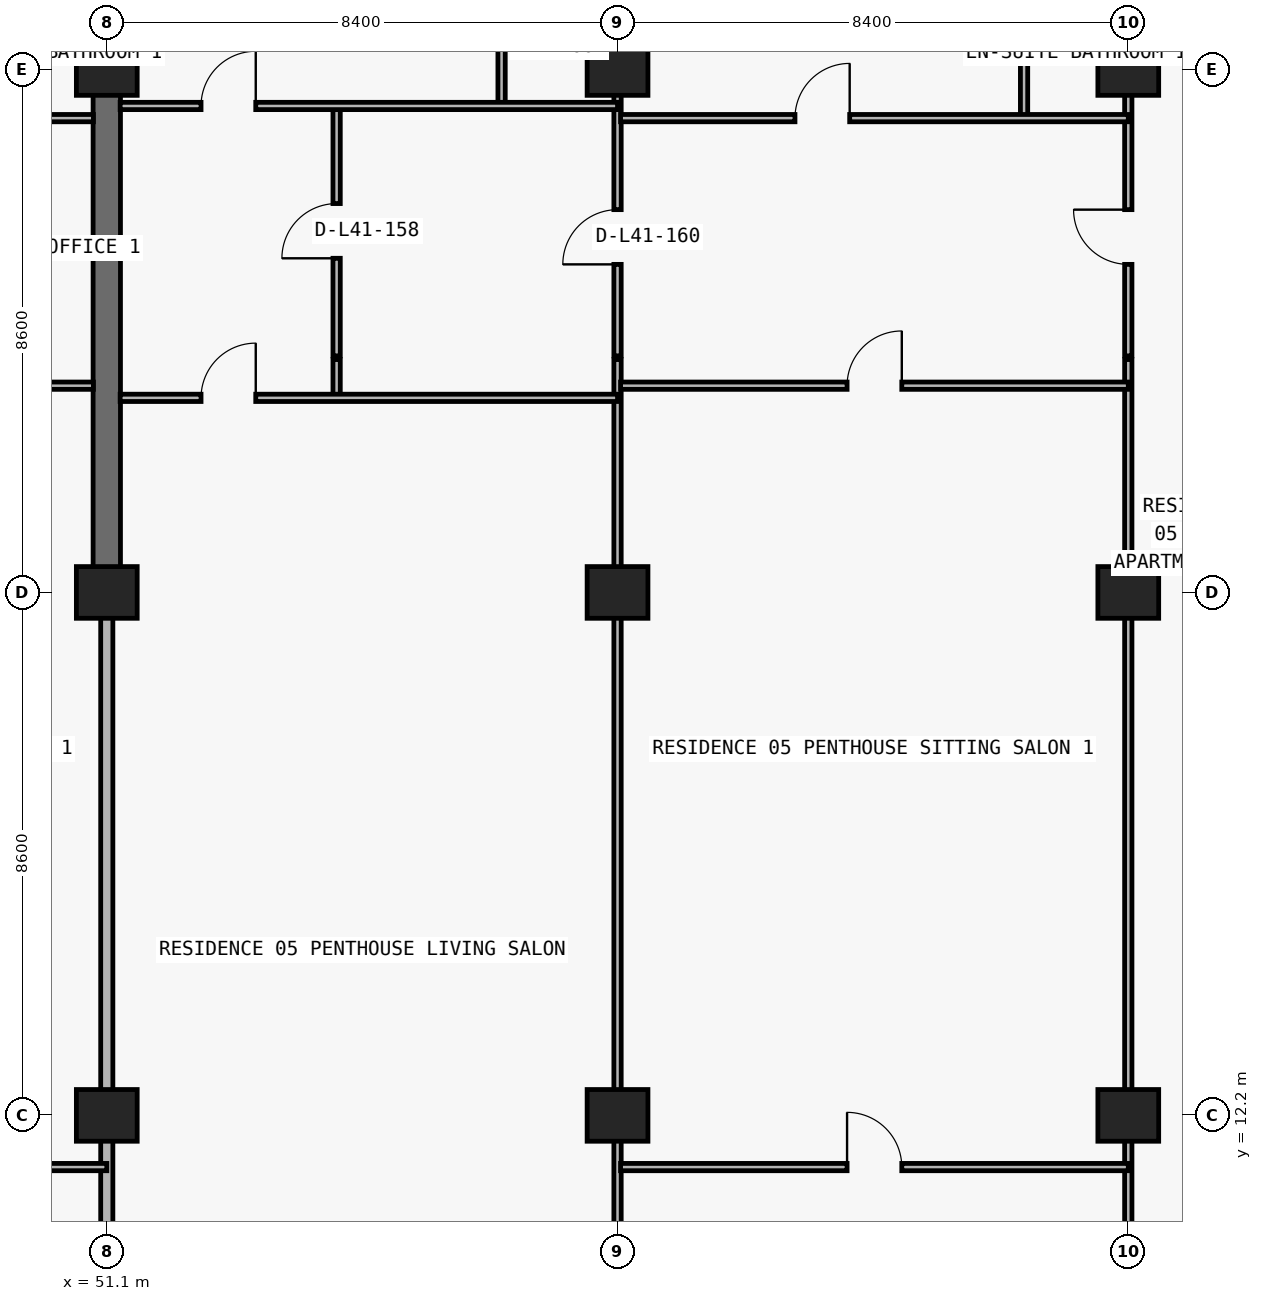
"""IFC4 building model, lengths in metres.
Left out: names, types, materials, properties, quantities, classifications, styles, units other than length and angle.
Written with IfcOpenShell. Run it as: python <this file> out.ifc"""

import sys

from ifc_helpers import new_model, si_unit, direction, frame, frame_2d, origin, origin_2d, place, context, subcontext, project, spatial, rectangle, extrude, element, fill, save


model = new_model("IFC4")
c1 = context("Model", 3, precision=1e-05, world=origin(), true_north=direction((0.0, 1.0)))
c2 = subcontext(c1, "Body", "Model", "MODEL_VIEW")
j1 = project(units=[si_unit("LENGTHUNIT", "METRE"), si_unit("PLANEANGLEUNIT", "RADIAN")], contexts=[c1])
p1 = place(None, origin())
s1 = spatial("IfcSite", under=j1, at=p1, CompositionType="ELEMENT")
p2 = place(p1, origin())
s2 = spatial("IfcBuilding", under=s1, at=p2, CompositionType="ELEMENT")
p3 = place(p2, frame((0.0, 0.0, 148.8)))
s3 = spatial("IfcBuildingStorey", under=s2, at=p3, CompositionType="ELEMENT", Elevation=148.8)
for number, where, z_axis, x_axis in (
    (1, (51.1, 12.2, 0.0), (0.0, 0.0, 1.0), (1.0, 0.0, 0.0)),
    (2, (59.5, 12.2, 0.0), (0.0, 0.0, 1.0), (1.0, 0.0, 0.0)),
    (3, (67.9, 12.2, 0.0), (0.0, 0.0, 1.0), (1.0, 0.0, 0.0)),
    (4, (51.1, 20.8, 0.0), (0.0, 0.0, 1.0), (1.0, 0.0, 0.0)),
    (5, (59.5, 20.8, 0.0), (0.0, 0.0, 1.0), (1.0, 0.0, 0.0)),
    (6, (67.9, 20.8, 0.0), (0.0, 0.0, 1.0), (1.0, 0.0, 0.0)),
    (7, (51.1, 29.4, 0.0), (0.0, 0.0, 1.0), (1.0, 0.0, 0.0)),
    (8, (59.5, 29.4, 0.0), (0.0, 0.0, 1.0), (1.0, 0.0, 0.0)),
    (9, (67.9, 29.4, 0.0), (0.0, 0.0, 1.0), (1.0, 0.0, 0.0)),
):
    element("IfcColumn", number, at=place(p3, frame(where, z_axis=z_axis, x_axis=x_axis)), inside=s3, PredefinedType="COLUMN", context=c2, shape_type="SweptSolid", body=[
        extrude(rectangle(XDim=1.0, YDim=0.85, at=origin_2d()), origin(), (0.0, 0.0, 1.0), 3.0),
    ])
p4 = place(p3, frame((51.1, 20.8, 0.0), z_axis=(0.0, 0.0, 1.0), x_axis=(0.0, 1.0, 0.0)))
e10 = element("IfcWall", 10, at=p4, inside=s3, PredefinedType="SHEAR", context=c2, shape_type="SweptSolid", body=[
    extrude(rectangle(XDim=8.6, YDim=0.45, at=frame_2d((4.3, 0.0))), origin(), (0.0, 0.0, 1.0), 3.0),
])
p5 = place(p3, frame((51.1, 8.84, 0.0), z_axis=(0.0, 0.0, 1.0), x_axis=(0.0, 1.0, 0.0)))
e11 = element("IfcWall", 11, at=p5, inside=s3, PredefinedType="PARTITIONING", context=c2, shape_type="SweptSolid", body=[
    extrude(rectangle(XDim=11.955, YDim=0.2, at=frame_2d((5.978, 0.0))), origin(), (0.0, 0.0, 1.0), 2.124),
])
p6 = place(p3, frame((51.1, 29.405, 0.0), z_axis=(0.0, 0.0, 1.0), x_axis=(0.0, 1.0, 0.0)))
e12 = element("IfcWall", 12, at=p6, inside=s3, PredefinedType="PARTITIONING", context=c2, shape_type="SweptSolid", body=[
    extrude(rectangle(XDim=0.375, YDim=0.2, at=frame_2d((0.188, 0.0))), origin(), (0.0, 0.0, 1.0), 3.0),
])
p7 = place(p3, frame((54.88, 24.0, 0.0), z_axis=(0.0, 0.0, 1.0), x_axis=(0.0, 1.0, 0.0)))
e13 = element("IfcWall", 13, at=p7, inside=s3, PredefinedType="PARTITIONING", context=c2, shape_type="SweptSolid", body=[
    extrude(rectangle(XDim=0.63, YDim=0.12, at=frame_2d((0.315, 0.0))), origin(), (0.0, 0.0, 1.0), 3.0),
])
p8 = place(p3, frame((54.88, 24.69, 0.0), z_axis=(0.0, 0.0, 1.0), x_axis=(0.0, 1.0, 0.0)))
e14 = element("IfcWall", 14, at=p8, inside=s3, PredefinedType="PARTITIONING", context=c2, shape_type="SweptSolid", body=[
    extrude(rectangle(XDim=4.11, YDim=0.12, at=frame_2d((2.055, 0.0))), origin(), (0.0, 0.0, 1.0), 3.0),
])
p9 = place(p8, frame((1.605, 0.0, 0.0)))
e15 = element("IfcOpeningElement", 15, at=p9, cuts=e14, PredefinedType="OPENING", context=c2, shape_type="SweptSolid", body=[
    extrude(rectangle(XDim=0.9, YDim=2.15, at=frame_2d((0.45, 1.075))), frame((0.0, 0.07, 0.0), z_axis=(0.0, -1.0, 0.0), x_axis=(1.0, 0.0, 0.0)), (0.0, 0.0, 1.0), 0.14),
])
p10 = place(p3, frame((57.593, 28.8, 0.0), z_axis=(0.0, 0.0, 1.0), x_axis=(0.0, 1.0, 0.0)))
e16 = element("IfcWall", 16, at=p10, inside=s3, PredefinedType="PARTITIONING", context=c2, shape_type="SweptSolid", body=[
    extrude(rectangle(XDim=0.98, YDim=0.12, at=frame_2d((0.49, 0.0))), origin(), (0.0, 0.0, 1.0), 2.629),
])
p11 = place(p3, frame((59.5, 8.84, 0.0), z_axis=(0.0, 0.0, 1.0), x_axis=(0.0, 1.0, 0.0)))
e17 = element("IfcWall", 17, at=p11, inside=s3, PredefinedType="PARTITIONING", context=c2, shape_type="SweptSolid", body=[
    extrude(rectangle(XDim=15.79, YDim=0.12, at=frame_2d((7.895, 0.0))), origin(), (0.0, 0.0, 1.0), 2.124),
])
p12 = place(p3, frame((59.5, 24.69, 0.0), z_axis=(0.0, 0.0, 1.0), x_axis=(0.0, 1.0, 0.0)))
e18 = element("IfcWall", 18, at=p12, inside=s3, PredefinedType="PARTITIONING", context=c2, shape_type="SweptSolid", body=[
    extrude(rectangle(XDim=5.09, YDim=0.12, at=frame_2d((2.545, 0.0))), origin(), (0.0, 0.0, 1.0), 2.124),
])
p13 = place(p12, frame((1.505, 0.0, 0.0)))
e19 = element("IfcOpeningElement", 19, at=p13, cuts=e18, PredefinedType="OPENING", context=c2, shape_type="SweptSolid", body=[
    extrude(rectangle(XDim=0.9, YDim=2.074, at=frame_2d((0.45, 1.037))), frame((0.0, 0.07, 0.0), z_axis=(0.0, -1.0, 0.0), x_axis=(1.0, 0.0, 0.0)), (0.0, 0.0, 1.0), 0.14),
])
p14 = place(p3, frame((66.186, 28.6, 0.0), z_axis=(0.0, 0.0, 1.0), x_axis=(0.0, 1.0, 0.0)))
e20 = element("IfcWall", 20, at=p14, inside=s3, PredefinedType="PARTITIONING", context=c2, shape_type="SweptSolid", body=[
    extrude(rectangle(XDim=1.18, YDim=0.12, at=frame_2d((0.59, 0.0))), origin(), (0.0, 0.0, 1.0), 3.0),
])
p15 = place(p3, frame((67.9, 8.84, 0.0), z_axis=(0.0, 0.0, 1.0), x_axis=(0.0, 1.0, 0.0)))
e21 = element("IfcWall", 21, at=p15, inside=s3, PredefinedType="PARTITIONING", context=c2, shape_type="SweptSolid", body=[
    extrude(rectangle(XDim=15.79, YDim=0.12, at=frame_2d((7.895, 0.0))), origin(), (0.0, 0.0, 1.0), 2.124),
])
p16 = place(p3, frame((67.9, 24.69, 0.0), z_axis=(0.0, 0.0, 1.0), x_axis=(0.0, 1.0, 0.0)))
e22 = element("IfcWall", 22, at=p16, inside=s3, PredefinedType="PARTITIONING", context=c2, shape_type="SweptSolid", body=[
    extrude(rectangle(XDim=5.09, YDim=0.12, at=frame_2d((2.545, 0.0))), origin(), (0.0, 0.0, 1.0), 2.124),
])
p17 = place(p16, frame((1.505, 0.0, 0.0)))
e23 = element("IfcOpeningElement", 23, at=p17, cuts=e22, PredefinedType="OPENING", context=c2, shape_type="SweptSolid", body=[
    extrude(rectangle(XDim=0.9, YDim=2.074, at=frame_2d((0.45, 1.037))), frame((0.0, 0.07, 0.0), z_axis=(0.0, -1.0, 0.0), x_axis=(1.0, 0.0, 0.0)), (0.0, 0.0, 1.0), 0.14),
])
p18 = place(p3, frame((42.7, 11.35, 0.0), z_axis=(0.0, 0.0, 1.0), x_axis=(1.0, 0.0, 0.0)))
e24 = element("IfcWall", 24, at=p18, inside=s3, PredefinedType="PARTITIONING", context=c2, shape_type="SweptSolid", body=[
    extrude(rectangle(XDim=8.4, YDim=0.12, at=frame_2d((4.2, 0.0))), origin(), (0.0, 0.0, 1.0), 3.0),
])
p19 = place(p18, frame((3.75, 0.0, 0.0)))
e25 = element("IfcOpeningElement", 25, at=p19, cuts=e24, PredefinedType="OPENING", context=c2, shape_type="SweptSolid", body=[
    extrude(rectangle(XDim=0.9, YDim=2.15, at=frame_2d((0.45, 1.075))), frame((0.0, 0.07, 0.0), z_axis=(0.0, -1.0, 0.0), x_axis=(1.0, 0.0, 0.0)), (0.0, 0.0, 1.0), 0.14),
])
p20 = place(p3, frame((59.55, 11.35, 0.0), z_axis=(0.0, 0.0, 1.0), x_axis=(1.0, 0.0, 0.0)))
e26 = element("IfcWall", 26, at=p20, inside=s3, PredefinedType="PARTITIONING", context=c2, shape_type="SweptSolid", body=[
    extrude(rectangle(XDim=8.35, YDim=0.12, at=frame_2d((4.175, 0.0))), origin(), (0.0, 0.0, 1.0), 3.0),
])
p21 = place(p20, frame((3.725, 0.0, 0.0)))
e27 = element("IfcOpeningElement", 27, at=p21, cuts=e26, PredefinedType="OPENING", context=c2, shape_type="SweptSolid", body=[
    extrude(rectangle(XDim=0.9, YDim=2.15, at=frame_2d((0.45, 1.075))), frame((0.0, 0.07, 0.0), z_axis=(0.0, -1.0, 0.0), x_axis=(1.0, 0.0, 0.0)), (0.0, 0.0, 1.0), 0.14),
])
p22 = place(p3, frame((51.32, 24.0, 0.0), z_axis=(0.0, 0.0, 1.0), x_axis=(1.0, 0.0, 0.0)))
e28 = element("IfcWall", 28, at=p22, inside=s3, PredefinedType="PARTITIONING", context=c2, shape_type="SweptSolid", body=[
    extrude(rectangle(XDim=8.18, YDim=0.12, at=frame_2d((4.09, 0.0))), origin(), (0.0, 0.0, 1.0), 3.0),
])
p23 = place(p22, frame((1.33, 0.0, 0.0)))
e29 = element("IfcOpeningElement", 29, at=p23, cuts=e28, PredefinedType="OPENING", context=c2, shape_type="SweptSolid", body=[
    extrude(rectangle(XDim=0.9, YDim=2.15, at=frame_2d((0.45, 1.075))), frame((0.0, 0.07, 0.0), z_axis=(0.0, -1.0, 0.0), x_axis=(1.0, 0.0, 0.0)), (0.0, 0.0, 1.0), 0.14),
])
p24 = place(p3, frame((42.705, 24.2, 0.0), z_axis=(0.0, 0.0, 1.0), x_axis=(1.0, 0.0, 0.0)))
e30 = element("IfcWall", 30, at=p24, inside=s3, PredefinedType="PARTITIONING", context=c2, shape_type="SweptSolid", body=[
    extrude(rectangle(XDim=8.175, YDim=0.12, at=frame_2d((4.087, 0.0))), origin(), (0.0, 0.0, 1.0), 3.0),
])
p25 = place(p24, frame((3.637, 0.0, 0.0)))
e31 = element("IfcOpeningElement", 31, at=p25, cuts=e30, PredefinedType="OPENING", context=c2, shape_type="SweptSolid", body=[
    extrude(rectangle(XDim=0.9, YDim=2.15, at=frame_2d((0.45, 1.075))), frame((0.0, 0.07, 0.0), z_axis=(0.0, -1.0, 0.0), x_axis=(1.0, 0.0, 0.0)), (0.0, 0.0, 1.0), 0.14),
])
p26 = place(p3, frame((59.55, 24.2, 0.0), z_axis=(0.0, 0.0, 1.0), x_axis=(1.0, 0.0, 0.0)))
e32 = element("IfcWall", 32, at=p26, inside=s3, PredefinedType="PARTITIONING", context=c2, shape_type="SweptSolid", body=[
    extrude(rectangle(XDim=8.35, YDim=0.12, at=frame_2d((4.175, 0.0))), origin(), (0.0, 0.0, 1.0), 3.0),
])
p27 = place(p26, frame((3.725, 0.0, 0.0)))
e33 = element("IfcOpeningElement", 33, at=p27, cuts=e32, PredefinedType="OPENING", context=c2, shape_type="SweptSolid", body=[
    extrude(rectangle(XDim=0.9, YDim=2.15, at=frame_2d((0.45, 1.075))), frame((0.0, 0.07, 0.0), z_axis=(0.0, -1.0, 0.0), x_axis=(1.0, 0.0, 0.0)), (0.0, 0.0, 1.0), 0.14),
])
p28 = place(p3, frame((42.7, 28.6, 0.0), z_axis=(0.0, 0.0, 1.0), x_axis=(1.0, 0.0, 0.0)))
e34 = element("IfcWall", 34, at=p28, inside=s3, PredefinedType="PARTITIONING", context=c2, shape_type="SweptSolid", body=[
    extrude(rectangle(XDim=8.18, YDim=0.12, at=frame_2d((4.09, 0.0))), origin(), (0.0, 0.0, 1.0), 3.0),
])
p29 = place(p28, frame((2.848, 0.0, 0.0)))
e35 = element("IfcOpeningElement", 35, at=p29, cuts=e34, PredefinedType="OPENING", context=c2, shape_type="SweptSolid", body=[
    extrude(rectangle(XDim=0.9, YDim=2.15, at=frame_2d((0.45, 1.075))), frame((0.0, 0.07, 0.0), z_axis=(0.0, -1.0, 0.0), x_axis=(1.0, 0.0, 0.0)), (0.0, 0.0, 1.0), 0.14),
])
p30 = place(p3, frame((59.55, 28.6, 0.0), z_axis=(0.0, 0.0, 1.0), x_axis=(1.0, 0.0, 0.0)))
e36 = element("IfcWall", 36, at=p30, inside=s3, PredefinedType="PARTITIONING", context=c2, shape_type="SweptSolid", body=[
    extrude(rectangle(XDim=8.35, YDim=0.12, at=frame_2d((4.175, 0.0))), origin(), (0.0, 0.0, 1.0), 3.0),
])
p31 = place(p30, frame((2.868, 0.0, 0.0)))
e37 = element("IfcOpeningElement", 37, at=p31, cuts=e36, PredefinedType="OPENING", context=c2, shape_type="SweptSolid", body=[
    extrude(rectangle(XDim=0.9, YDim=2.15, at=frame_2d((0.45, 1.075))), frame((0.0, 0.07, 0.0), z_axis=(0.0, -1.0, 0.0), x_axis=(1.0, 0.0, 0.0)), (0.0, 0.0, 1.0), 0.14),
])
p32 = place(p3, frame((51.32, 28.8, 0.0), z_axis=(0.0, 0.0, 1.0), x_axis=(1.0, 0.0, 0.0)))
e38 = element("IfcWall", 38, at=p32, inside=s3, PredefinedType="PARTITIONING", context=c2, shape_type="SweptSolid", body=[
    extrude(rectangle(XDim=8.18, YDim=0.12, at=frame_2d((4.09, 0.0))), origin(), (0.0, 0.0, 1.0), 3.0),
])
p33 = place(p32, frame((1.33, 0.0, 0.0)))
e39 = element("IfcOpeningElement", 39, at=p33, cuts=e38, PredefinedType="OPENING", context=c2, shape_type="SweptSolid", body=[
    extrude(rectangle(XDim=0.9, YDim=2.15, at=frame_2d((0.45, 1.075))), frame((0.0, 0.07, 0.0), z_axis=(0.0, -1.0, 0.0), x_axis=(1.0, 0.0, 0.0)), (0.0, 0.0, 1.0), 0.14),
])
p34 = place(p33, origin())
e40 = element("IfcDoor", 40, at=p34, inside=s3, OperationType="SINGLE_SWING_RIGHT", PredefinedType="DOOR", context=c2, shape_type="SweptSolid", body=[
    extrude(rectangle(XDim=0.9, YDim=2.15, at=frame_2d((0.45, 1.075))), frame((0.0, 0.025, 0.0), z_axis=(0.0, -1.0, 0.0), x_axis=(1.0, 0.0, 0.0)), (0.0, 0.0, 1.0), 0.05),
])
fill(e39, e40)
p35 = place(p9, origin())
e41 = element("IfcDoor", 41, at=p35, inside=s3, OperationType="SINGLE_SWING_LEFT", PredefinedType="DOOR", context=c2, shape_type="SweptSolid", body=[
    extrude(rectangle(XDim=0.9, YDim=2.15, at=frame_2d((0.45, 1.075))), frame((0.0, 0.025, 0.0), z_axis=(0.0, -1.0, 0.0), x_axis=(1.0, 0.0, 0.0)), (0.0, 0.0, 1.0), 0.05),
])
fill(e15, e41)
p36 = place(p23, origin())
e42 = element("IfcDoor", 42, at=p36, inside=s3, OperationType="SINGLE_SWING_RIGHT", PredefinedType="DOOR", context=c2, shape_type="SweptSolid", body=[
    extrude(rectangle(XDim=0.9, YDim=2.15, at=frame_2d((0.45, 1.075))), frame((0.0, 0.025, 0.0), z_axis=(0.0, -1.0, 0.0), x_axis=(1.0, 0.0, 0.0)), (0.0, 0.0, 1.0), 0.05),
])
fill(e29, e42)
p37 = place(p13, origin())
e43 = element("IfcDoor", 43, at=p37, inside=s3, OperationType="SINGLE_SWING_LEFT", PredefinedType="DOOR", context=c2, shape_type="SweptSolid", body=[
    extrude(rectangle(XDim=0.9, YDim=2.074, at=frame_2d((0.45, 1.037))), frame((0.0, 0.025, 0.0), z_axis=(0.0, -1.0, 0.0), x_axis=(1.0, 0.0, 0.0)), (0.0, 0.0, 1.0), 0.05),
])
fill(e19, e43)
p38 = place(p31, origin())
e44 = element("IfcDoor", 44, at=p38, inside=s3, OperationType="SINGLE_SWING_RIGHT", PredefinedType="DOOR", context=c2, shape_type="SweptSolid", body=[
    extrude(rectangle(XDim=0.9, YDim=2.15, at=frame_2d((0.45, 1.075))), frame((0.0, 0.025, 0.0), z_axis=(0.0, -1.0, 0.0), x_axis=(1.0, 0.0, 0.0)), (0.0, 0.0, 1.0), 0.05),
])
fill(e37, e44)
p39 = place(p27, origin())
e45 = element("IfcDoor", 45, at=p39, inside=s3, OperationType="SINGLE_SWING_RIGHT", PredefinedType="DOOR", context=c2, shape_type="SweptSolid", body=[
    extrude(rectangle(XDim=0.9, YDim=2.15, at=frame_2d((0.45, 1.075))), frame((0.0, 0.025, 0.0), z_axis=(0.0, -1.0, 0.0), x_axis=(1.0, 0.0, 0.0)), (0.0, 0.0, 1.0), 0.05),
])
fill(e33, e45)
p40 = place(p21, origin())
e46 = element("IfcDoor", 46, at=p40, inside=s3, OperationType="SINGLE_SWING_LEFT", PredefinedType="DOOR", context=c2, shape_type="SweptSolid", body=[
    extrude(rectangle(XDim=0.9, YDim=2.15, at=frame_2d((0.45, 1.075))), frame((0.0, 0.025, 0.0), z_axis=(0.0, -1.0, 0.0), x_axis=(1.0, 0.0, 0.0)), (0.0, 0.0, 1.0), 0.05),
])
fill(e27, e46)
p41 = place(p17, origin())
e47 = element("IfcDoor", 47, at=p41, inside=s3, OperationType="SINGLE_SWING_RIGHT", PredefinedType="DOOR", context=c2, shape_type="SweptSolid", body=[
    extrude(rectangle(XDim=0.9, YDim=2.074, at=frame_2d((0.45, 1.037))), frame((0.0, 0.025, 0.0), z_axis=(0.0, -1.0, 0.0), x_axis=(1.0, 0.0, 0.0)), (0.0, 0.0, 1.0), 0.05),
])
fill(e23, e47)
save(model, sys.argv[1])
